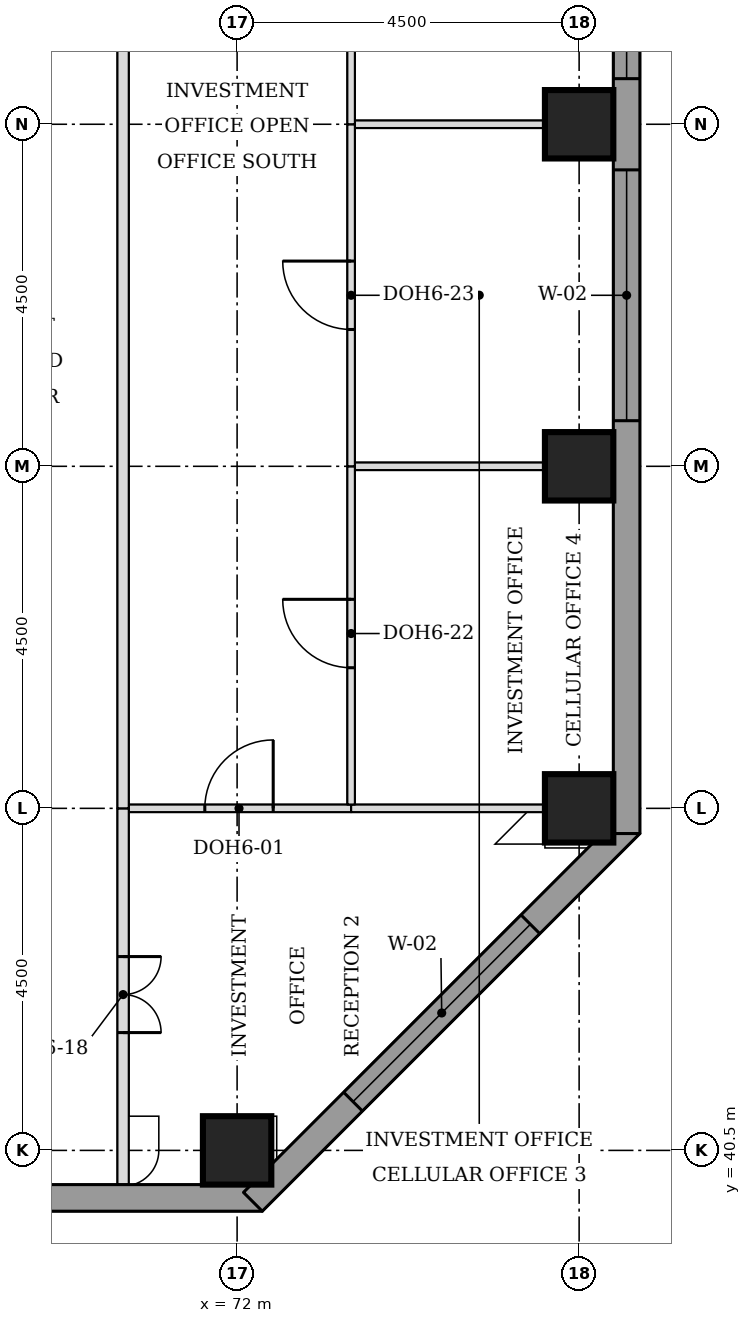
"""IFC4 building model, lengths in metres.
Left out: names, types, materials, properties, quantities, classifications, styles, units other than length and angle.
Written with IfcOpenShell. Run it as: python <this file> out.ifc"""

import sys

from ifc_helpers import new_model, si_unit, direction, frame, frame_2d, origin, origin_2d, place, context, subcontext, project, spatial, rectangle, extrude, element, fill, save


model = new_model("IFC4")
c1 = context("Model", 3, precision=1e-05, world=origin(), true_north=direction((0.0, 1.0)))
c2 = subcontext(c1, "Body", "Model", "MODEL_VIEW")
j1 = project(units=[si_unit("LENGTHUNIT", "METRE"), si_unit("PLANEANGLEUNIT", "RADIAN")], contexts=[c1])
p1 = place(None, origin())
s1 = spatial("IfcSite", under=j1, at=p1, CompositionType="ELEMENT")
p2 = place(p1, origin())
s2 = spatial("IfcBuilding", under=s1, at=p2, CompositionType="ELEMENT")
p3 = place(p2, frame((0.0, 0.0, 184.7)))
s3 = spatial("IfcBuildingStorey", under=s2, at=p3, CompositionType="ELEMENT", Elevation=184.7)
for number, where, z_axis, x_axis in (
    (1, (72.0, 40.5, 0.0), (0.0, 0.0, 1.0), (1.0, 0.0, 0.0)),
    (2, (76.5, 45.0, 0.0), (0.0, 0.0, 1.0), (1.0, 0.0, 0.0)),
    (3, (76.5, 49.5, 0.0), (0.0, 0.0, 1.0), (1.0, 0.0, 0.0)),
    (4, (76.5, 54.0, 0.0), (0.0, 0.0, 1.0), (1.0, 0.0, 0.0)),
):
    element("IfcColumn", number, at=place(p3, frame(where, z_axis=z_axis, x_axis=x_axis)), inside=s3, PredefinedType="COLUMN", context=c2, shape_type="SweptSolid", body=[
        extrude(rectangle(XDim=0.9, YDim=0.9, at=origin_2d()), origin(), (0.0, 0.0, 1.0), 3.7),
    ])
p4 = place(p3, frame((36.0, 39.875, 0.0), z_axis=(0.0, 0.0, 1.0), x_axis=(1.0, 0.0, 0.0)))
e5 = element("IfcWall", 5, at=p4, inside=s3, PredefinedType="STANDARD", context=c2, shape_type="SweptSolid", body=[
    extrude(rectangle(XDim=36.331, YDim=0.35, at=frame_2d((18.166, 0.0))), origin(), (0.0, 0.0, 1.0), 3.525),
])
p5 = place(p4, frame((5.1, 0.0, 0.9)))
e6 = element("IfcOpeningElement", 6, at=p5, cuts=e5, PredefinedType="OPENING", context=c2, shape_type="SweptSolid", body=[
    extrude(rectangle(XDim=3.3, YDim=1.9, at=frame_2d((1.65, 0.95))), frame((0.0, 0.185, 0.0), z_axis=(0.0, -1.0, 0.0), x_axis=(1.0, 0.0, 0.0)), (0.0, 0.0, 1.0), 0.37),
])
p6 = place(p4, frame((9.6, 0.0, 0.9)))
e7 = element("IfcOpeningElement", 7, at=p6, cuts=e5, PredefinedType="OPENING", context=c2, shape_type="SweptSolid", body=[
    extrude(rectangle(XDim=3.3, YDim=1.9, at=frame_2d((1.65, 0.95))), frame((0.0, 0.185, 0.0), z_axis=(0.0, -1.0, 0.0), x_axis=(1.0, 0.0, 0.0)), (0.0, 0.0, 1.0), 0.37),
])
p7 = place(p4, frame((14.1, 0.0, 0.9)))
e8 = element("IfcOpeningElement", 8, at=p7, cuts=e5, PredefinedType="OPENING", context=c2, shape_type="SweptSolid", body=[
    extrude(rectangle(XDim=3.3, YDim=1.9, at=frame_2d((1.65, 0.95))), frame((0.0, 0.185, 0.0), z_axis=(0.0, -1.0, 0.0), x_axis=(1.0, 0.0, 0.0)), (0.0, 0.0, 1.0), 0.37),
])
p8 = place(p4, frame((18.6, 0.0, 0.9)))
e9 = element("IfcOpeningElement", 9, at=p8, cuts=e5, PredefinedType="OPENING", context=c2, shape_type="SweptSolid", body=[
    extrude(rectangle(XDim=3.3, YDim=1.9, at=frame_2d((1.65, 0.95))), frame((0.0, 0.185, 0.0), z_axis=(0.0, -1.0, 0.0), x_axis=(1.0, 0.0, 0.0)), (0.0, 0.0, 1.0), 0.37),
])
p9 = place(p4, frame((23.1, 0.0, 0.9)))
e10 = element("IfcOpeningElement", 10, at=p9, cuts=e5, PredefinedType="OPENING", context=c2, shape_type="SweptSolid", body=[
    extrude(rectangle(XDim=3.3, YDim=1.9, at=frame_2d((1.65, 0.95))), frame((0.0, 0.185, 0.0), z_axis=(0.0, -1.0, 0.0), x_axis=(1.0, 0.0, 0.0)), (0.0, 0.0, 1.0), 0.37),
])
p10 = place(p4, frame((27.6, 0.0, 0.9)))
e11 = element("IfcOpeningElement", 11, at=p10, cuts=e5, PredefinedType="OPENING", context=c2, shape_type="SweptSolid", body=[
    extrude(rectangle(XDim=3.3, YDim=1.9, at=frame_2d((1.65, 0.95))), frame((0.0, 0.185, 0.0), z_axis=(0.0, -1.0, 0.0), x_axis=(1.0, 0.0, 0.0)), (0.0, 0.0, 1.0), 0.37),
])
p11 = place(p3, frame((72.208, 39.824, 0.0), z_axis=(0.0, 0.0, 1.0), x_axis=(0.707106781187, 0.707106781187, 0.0)))
e12 = element("IfcWall", 12, at=p11, inside=s3, PredefinedType="STANDARD", context=c2, shape_type="SweptSolid", body=[
    extrude(rectangle(XDim=7.027, YDim=0.35, at=frame_2d((3.513, 0.0))), origin(), (0.0, 0.0, 1.0), 3.525),
])
p12 = place(p11, frame((1.863, 0.0, 0.9)))
e13 = element("IfcOpeningElement", 13, at=p12, cuts=e12, PredefinedType="OPENING", context=c2, shape_type="SweptSolid", body=[
    extrude(rectangle(XDim=3.3, YDim=1.9, at=frame_2d((1.65, 0.95))), frame((0.0, 0.185, 0.0), z_axis=(0.0, -1.0, 0.0), x_axis=(1.0, 0.0, 0.0)), (0.0, 0.0, 1.0), 0.37),
])
p13 = place(p3, frame((77.125, 44.669, 0.0), z_axis=(0.0, 0.0, 1.0), x_axis=(0.0, 1.0, 0.0)))
e14 = element("IfcWall", 14, at=p13, inside=s3, PredefinedType="STANDARD", context=c2, shape_type="SweptSolid", body=[
    extrude(rectangle(XDim=32.163, YDim=0.35, at=frame_2d((16.081, 0.0))), origin(), (0.0, 0.0, 1.0), 3.525),
])
p14 = place(p13, frame((5.431, 0.0, 0.9)))
e15 = element("IfcOpeningElement", 15, at=p14, cuts=e14, PredefinedType="OPENING", context=c2, shape_type="SweptSolid", body=[
    extrude(rectangle(XDim=3.3, YDim=1.9, at=frame_2d((1.65, 0.95))), frame((0.0, 0.185, 0.0), z_axis=(0.0, -1.0, 0.0), x_axis=(1.0, 0.0, 0.0)), (0.0, 0.0, 1.0), 0.37),
])
p15 = place(p13, frame((9.931, 0.0, 0.9)))
e16 = element("IfcOpeningElement", 16, at=p15, cuts=e14, PredefinedType="OPENING", context=c2, shape_type="SweptSolid", body=[
    extrude(rectangle(XDim=3.3, YDim=1.9, at=frame_2d((1.65, 0.95))), frame((0.0, 0.185, 0.0), z_axis=(0.0, -1.0, 0.0), x_axis=(1.0, 0.0, 0.0)), (0.0, 0.0, 1.0), 0.37),
])
p16 = place(p13, frame((14.431, 0.0, 0.9)))
e17 = element("IfcOpeningElement", 17, at=p16, cuts=e14, PredefinedType="OPENING", context=c2, shape_type="SweptSolid", body=[
    extrude(rectangle(XDim=3.3, YDim=1.9, at=frame_2d((1.65, 0.95))), frame((0.0, 0.185, 0.0), z_axis=(0.0, -1.0, 0.0), x_axis=(1.0, 0.0, 0.0)), (0.0, 0.0, 1.0), 0.37),
])
p17 = place(p13, frame((18.931, 0.0, 0.9)))
e18 = element("IfcOpeningElement", 18, at=p17, cuts=e14, PredefinedType="OPENING", context=c2, shape_type="SweptSolid", body=[
    extrude(rectangle(XDim=3.3, YDim=1.9, at=frame_2d((1.65, 0.95))), frame((0.0, 0.185, 0.0), z_axis=(0.0, -1.0, 0.0), x_axis=(1.0, 0.0, 0.0)), (0.0, 0.0, 1.0), 0.37),
])
p18 = place(p13, frame((23.431, 0.0, 0.9)))
e19 = element("IfcOpeningElement", 19, at=p18, cuts=e14, PredefinedType="OPENING", context=c2, shape_type="SweptSolid", body=[
    extrude(rectangle(XDim=3.3, YDim=1.9, at=frame_2d((1.65, 0.95))), frame((0.0, 0.185, 0.0), z_axis=(0.0, -1.0, 0.0), x_axis=(1.0, 0.0, 0.0)), (0.0, 0.0, 1.0), 0.37),
])
p19 = place(p3, frame((70.575, 45.0, 0.0), z_axis=(0.0, 0.0, 1.0), x_axis=(1.0, 0.0, 0.0)))
e20 = element("IfcWall", 20, at=p19, inside=s3, PredefinedType="PARTITIONING", context=c2, shape_type="SweptSolid", body=[
    extrude(rectangle(XDim=2.925, YDim=0.1, at=frame_2d((1.462, 0.0))), origin(), (0.0, 0.0, 1.0), 3.096),
])
p20 = place(p19, frame((1.0, 0.0, 0.0)))
e21 = element("IfcOpeningElement", 21, at=p20, cuts=e20, PredefinedType="OPENING", context=c2, shape_type="SweptSolid", body=[
    extrude(rectangle(XDim=0.9, YDim=2.1, at=frame_2d((0.45, 1.05))), frame((0.0, 0.06, 0.0), z_axis=(0.0, -1.0, 0.0), x_axis=(1.0, 0.0, 0.0)), (0.0, 0.0, 1.0), 0.12),
])
p21 = place(p3, frame((73.5, 45.0, 0.0), z_axis=(0.0, 0.0, 1.0), x_axis=(1.0, 0.0, 0.0)))
e22 = element("IfcWall", 22, at=p21, inside=s3, PredefinedType="PARTITIONING", context=c2, shape_type="SweptSolid", body=[
    extrude(rectangle(XDim=2.55, YDim=0.1, at=frame_2d((1.275, 0.0))), origin(), (0.0, 0.0, 1.0), 3.096),
])
for number, where, z_axis, x_axis in (
    (23, (73.55, 49.5, 0.0), (0.0, 0.0, 1.0), (1.0, 0.0, 0.0)),
    (24, (73.55, 54.0, 0.0), (0.0, 0.0, 1.0), (1.0, 0.0, 0.0)),
):
    element("IfcWall", number, at=place(p3, frame(where, z_axis=z_axis, x_axis=x_axis)), inside=s3, PredefinedType="PARTITIONING", context=c2, shape_type="SweptSolid", body=[
        extrude(rectangle(XDim=3.4, YDim=0.1, at=frame_2d((1.7, 0.0))), origin(), (0.0, 0.0, 1.0), 3.55),
    ])
p22 = place(p3, frame((70.5, 40.05, 0.0), z_axis=(0.0, 0.0, 1.0), x_axis=(0.0, 1.0, 0.0)))
e25 = element("IfcWall", 25, at=p22, inside=s3, PredefinedType="PARTITIONING", context=c2, shape_type="SweptSolid", body=[
    extrude(rectangle(XDim=4.95, YDim=0.15, at=frame_2d((2.475, 0.0))), origin(), (0.0, 0.0, 1.0), 3.55),
])
p23 = place(p22, frame((2.0, 0.0, 0.0)))
e26 = element("IfcOpeningElement", 26, at=p23, cuts=e25, PredefinedType="OPENING", context=c2, shape_type="SweptSolid", body=[
    extrude(rectangle(XDim=1.0, YDim=2.1, at=frame_2d((0.5, 1.05))), frame((0.0, 0.085, 0.0), z_axis=(0.0, -1.0, 0.0), x_axis=(1.0, 0.0, 0.0)), (0.0, 0.0, 1.0), 0.17),
])
p24 = place(p3, frame((70.5, 45.0, 0.0), z_axis=(0.0, 0.0, 1.0), x_axis=(0.0, 1.0, 0.0)))
e27 = element("IfcWall", 27, at=p24, inside=s3, PredefinedType="PARTITIONING", context=c2, shape_type="SweptSolid", body=[
    extrude(rectangle(XDim=21.0, YDim=0.15, at=frame_2d((10.5, 0.0))), origin(), (0.0, 0.0, 1.0), 3.55),
])
p25 = place(p3, frame((73.5, 45.05, 0.0), z_axis=(0.0, 0.0, 1.0), x_axis=(0.0, 1.0, 0.0)))
e28 = element("IfcWall", 28, at=p25, inside=s3, PredefinedType="PARTITIONING", context=c2, shape_type="SweptSolid", body=[
    extrude(rectangle(XDim=4.45, YDim=0.1, at=frame_2d((2.225, 0.0))), origin(), (0.0, 0.0, 1.0), 3.55),
])
p26 = place(p25, frame((1.8, 0.0, 0.0)))
e29 = element("IfcOpeningElement", 29, at=p26, cuts=e28, PredefinedType="OPENING", context=c2, shape_type="SweptSolid", body=[
    extrude(rectangle(XDim=0.9, YDim=2.1, at=frame_2d((0.45, 1.05))), frame((0.0, 0.06, 0.0), z_axis=(0.0, -1.0, 0.0), x_axis=(1.0, 0.0, 0.0)), (0.0, 0.0, 1.0), 0.12),
])
p27 = place(p3, frame((73.5, 49.5, 0.0), z_axis=(0.0, 0.0, 1.0), x_axis=(0.0, 1.0, 0.0)))
e30 = element("IfcWall", 30, at=p27, inside=s3, PredefinedType="PARTITIONING", context=c2, shape_type="SweptSolid", body=[
    extrude(rectangle(XDim=4.5, YDim=0.1, at=frame_2d((2.25, 0.0))), origin(), (0.0, 0.0, 1.0), 3.55),
])
p28 = place(p27, frame((1.8, 0.0, 0.0)))
e31 = element("IfcOpeningElement", 31, at=p28, cuts=e30, PredefinedType="OPENING", context=c2, shape_type="SweptSolid", body=[
    extrude(rectangle(XDim=0.9, YDim=2.1, at=frame_2d((0.45, 1.05))), frame((0.0, 0.06, 0.0), z_axis=(0.0, -1.0, 0.0), x_axis=(1.0, 0.0, 0.0)), (0.0, 0.0, 1.0), 0.12),
])
p29 = place(p3, frame((73.5, 54.0, 0.0), z_axis=(0.0, 0.0, 1.0), x_axis=(0.0, 1.0, 0.0)))
e32 = element("IfcWall", 32, at=p29, inside=s3, PredefinedType="PARTITIONING", context=c2, shape_type="SweptSolid", body=[
    extrude(rectangle(XDim=4.5, YDim=0.1, at=frame_2d((2.25, 0.0))), origin(), (0.0, 0.0, 1.0), 3.55),
])
p30 = place(p29, frame((1.8, 0.0, 0.0)))
e33 = element("IfcOpeningElement", 33, at=p30, cuts=e32, PredefinedType="OPENING", context=c2, shape_type="SweptSolid", body=[
    extrude(rectangle(XDim=0.9, YDim=2.1, at=frame_2d((0.45, 1.05))), frame((0.0, 0.06, 0.0), z_axis=(0.0, -1.0, 0.0), x_axis=(1.0, 0.0, 0.0)), (0.0, 0.0, 1.0), 0.12),
])
p31 = place(p12, origin())
e34 = element("IfcWindow", 34, at=p31, inside=s3, PartitioningType="SINGLE_PANEL", PredefinedType="WINDOW", context=c2, shape_type="SweptSolid", body=[
    extrude(rectangle(XDim=3.3, YDim=1.9, at=frame_2d((1.65, 0.95))), frame((0.0, 0.085, 0.0), z_axis=(0.0, -1.0, 0.0), x_axis=(1.0, 0.0, 0.0)), (0.0, 0.0, 1.0), 0.06),
])
fill(e13, e34)
p32 = place(p14, origin())
e35 = element("IfcWindow", 35, at=p32, inside=s3, PartitioningType="SINGLE_PANEL", PredefinedType="WINDOW", context=c2, shape_type="SweptSolid", body=[
    extrude(rectangle(XDim=3.3, YDim=1.9, at=frame_2d((1.65, 0.95))), frame((0.0, 0.085, 0.0), z_axis=(0.0, -1.0, 0.0), x_axis=(1.0, 0.0, 0.0)), (0.0, 0.0, 1.0), 0.06),
])
fill(e15, e35)
p33 = place(p15, origin())
e36 = element("IfcWindow", 36, at=p33, inside=s3, PartitioningType="SINGLE_PANEL", PredefinedType="WINDOW", context=c2, shape_type="SweptSolid", body=[
    extrude(rectangle(XDim=3.3, YDim=1.9, at=frame_2d((1.65, 0.95))), frame((0.0, 0.085, 0.0), z_axis=(0.0, -1.0, 0.0), x_axis=(1.0, 0.0, 0.0)), (0.0, 0.0, 1.0), 0.06),
])
fill(e16, e36)
p34 = place(p23, frame((1.0, 0.0, 0.0), z_axis=(0.0, 0.0, 1.0), x_axis=(-1.0, 0.0, 0.0)))
e37 = element("IfcDoor", 37, at=p34, inside=s3, OperationType="DOUBLE_DOOR_SINGLE_SWING", PredefinedType="DOOR", context=c2, shape_type="SweptSolid", body=[
    extrude(rectangle(XDim=1.0, YDim=2.1, at=frame_2d((0.5, 1.05))), frame((0.0, 0.025, 0.0), z_axis=(0.0, -1.0, 0.0), x_axis=(1.0, 0.0, 0.0)), (0.0, 0.0, 1.0), 0.05),
])
fill(e26, e37)
p35 = place(p20, origin())
e38 = element("IfcDoor", 38, at=p35, inside=s3, OperationType="SINGLE_SWING_RIGHT", PredefinedType="DOOR", context=c2, shape_type="SweptSolid", body=[
    extrude(rectangle(XDim=0.9, YDim=2.1, at=frame_2d((0.45, 1.05))), frame((0.0, 0.025, 0.0), z_axis=(0.0, -1.0, 0.0), x_axis=(1.0, 0.0, 0.0)), (0.0, 0.0, 1.0), 0.05),
])
fill(e21, e38)
p36 = place(p26, origin())
e39 = element("IfcDoor", 39, at=p36, inside=s3, OperationType="SINGLE_SWING_RIGHT", PredefinedType="DOOR", context=c2, shape_type="SweptSolid", body=[
    extrude(rectangle(XDim=0.9, YDim=2.1, at=frame_2d((0.45, 1.05))), frame((0.0, 0.025, 0.0), z_axis=(0.0, -1.0, 0.0), x_axis=(1.0, 0.0, 0.0)), (0.0, 0.0, 1.0), 0.05),
])
fill(e29, e39)
p37 = place(p28, origin())
e40 = element("IfcDoor", 40, at=p37, inside=s3, OperationType="SINGLE_SWING_RIGHT", PredefinedType="DOOR", context=c2, shape_type="SweptSolid", body=[
    extrude(rectangle(XDim=0.9, YDim=2.1, at=frame_2d((0.45, 1.05))), frame((0.0, 0.025, 0.0), z_axis=(0.0, -1.0, 0.0), x_axis=(1.0, 0.0, 0.0)), (0.0, 0.0, 1.0), 0.05),
])
fill(e31, e40)
save(model, sys.argv[1])
